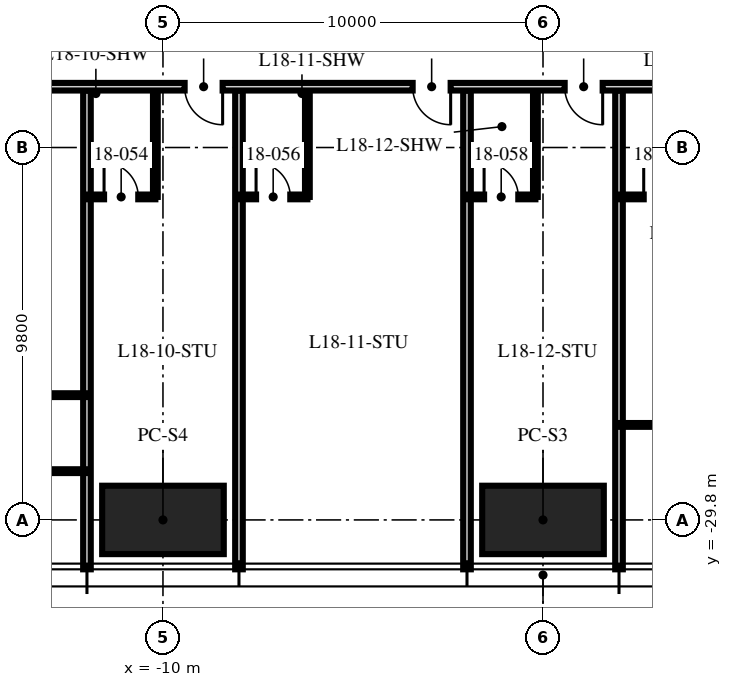
"""IFC4 building model, lengths in metres.
Left out: names, types, materials, properties, quantities, classifications, styles, units other than length and angle.
Written with IfcOpenShell. Run it as: python <this file> out.ifc"""

import sys

from ifc_helpers import new_model, si_unit, direction, frame, frame_2d, origin, origin_2d, place, context, subcontext, project, spatial, rectangle, hollow_rectangle, extrude, element, fill, save


model = new_model("IFC4")
c1 = context("Model", 3, precision=1e-05, world=origin(), true_north=direction((0.0, 1.0)))
c2 = subcontext(c1, "Body", "Model", "MODEL_VIEW")
j1 = project(units=[si_unit("LENGTHUNIT", "METRE"), si_unit("PLANEANGLEUNIT", "RADIAN")], contexts=[c1])
p1 = place(None, origin())
s1 = spatial("IfcSite", under=j1, at=p1, CompositionType="ELEMENT")
p2 = place(p1, origin())
s2 = spatial("IfcBuilding", under=s1, at=p2, CompositionType="ELEMENT")
p3 = place(p2, frame((0.0, 0.0, 73.5)))
s3 = spatial("IfcBuildingStorey", under=s2, at=p3, CompositionType="ELEMENT", Elevation=73.5)
for number, where, z_axis, x_axis in (
    (1, (0.0, -29.8, 0.0), (0.0, 0.0, 1.0), (1.0, 0.0, 0.0)),
    (2, (-10.0, -29.8, 0.0), (0.0, 0.0, 1.0), (1.0, 0.0, 0.0)),
):
    element("IfcColumn", number, at=place(p3, frame(where, z_axis=z_axis, x_axis=x_axis)), inside=s3, PredefinedType="COLUMN", context=c2, shape_type="SweptSolid", body=[
        extrude(hollow_rectangle(XDim=3.2, YDim=1.8, WallThickness=0.2, at=origin_2d()), origin(), (0.0, 0.0, 1.0), 3.75),
    ])
for number, where, z_axis, x_axis in (
    (3, (-12.0, -18.5, 0.0), (0.0, 0.0, 1.0), (0.0, -1.0, 0.0)),
    (4, (-8.0, -18.5, 0.0), (0.0, 0.0, 1.0), (0.0, -1.0, 0.0)),
    (5, (-2.0, -18.5, 0.0), (0.0, 0.0, 1.0), (0.0, -1.0, 0.0)),
    (6, (2.0, -18.5, 0.0), (0.0, 0.0, 1.0), (0.0, -1.0, 0.0)),
):
    element("IfcWall", number, at=place(p3, frame(where, z_axis=z_axis, x_axis=x_axis)), inside=s3, PredefinedType="PARTITIONING", context=c2, shape_type="SweptSolid", body=[
        extrude(rectangle(XDim=12.6, YDim=0.2, at=frame_2d((6.3, 0.0))), origin(), (0.0, 0.0, 1.0), 2.71),
    ])
p4 = place(p3, frame((-18.0, -28.517, 0.0), z_axis=(0.0, 0.0, 1.0), x_axis=(1.0, 0.0, 0.0)))
e7 = element("IfcWall", 7, at=p4, inside=s3, PredefinedType="PARTITIONING", context=c2, shape_type="SweptSolid", body=[
    extrude(rectangle(XDim=6.0, YDim=0.1, at=frame_2d((3.0, 0.0))), origin(), (0.0, 0.0, 1.0), 2.61),
])
p5 = place(p4, frame((0.15, 0.0, 0.0)))
e8 = element("IfcOpeningElement", 8, at=p5, cuts=e7, PredefinedType="OPENING", context=c2, shape_type="SweptSolid", body=[
    extrude(rectangle(XDim=0.9, YDim=2.1, at=frame_2d((0.45, 1.05))), frame((0.0, 0.06, 0.0), z_axis=(0.0, -1.0, 0.0), x_axis=(1.0, 0.0, 0.0)), (0.0, 0.0, 1.0), 0.12),
])
p6 = place(p4, frame((3.15, 0.0, 0.0)))
e9 = element("IfcOpeningElement", 9, at=p6, cuts=e7, PredefinedType="OPENING", context=c2, shape_type="SweptSolid", body=[
    extrude(rectangle(XDim=0.9, YDim=2.1, at=frame_2d((0.45, 1.05))), frame((0.0, 0.06, 0.0), z_axis=(0.0, -1.0, 0.0), x_axis=(1.0, 0.0, 0.0)), (0.0, 0.0, 1.0), 0.12),
])
p7 = place(p3, frame((-16.8, -26.517, 0.0), z_axis=(0.0, 0.0, 1.0), x_axis=(1.0, 0.0, 0.0)))
e10 = element("IfcWall", 10, at=p7, inside=s3, PredefinedType="PARTITIONING", context=c2, shape_type="SweptSolid", body=[
    extrude(rectangle(XDim=4.8, YDim=0.1, at=frame_2d((2.4, 0.0))), origin(), (0.0, 0.0, 1.0), 2.61),
])
p8 = place(p3, frame((-12.0, -21.3, 0.0), z_axis=(0.0, 0.0, 1.0), x_axis=(1.0, 0.0, 0.0)))
e11 = element("IfcWall", 11, at=p8, inside=s3, PredefinedType="PARTITIONING", context=c2, shape_type="SweptSolid", body=[
    extrude(rectangle(XDim=1.8, YDim=0.125, at=frame_2d((0.9, 0.0))), origin(), (0.0, 0.0, 1.0), 3.5),
])
p9 = place(p8, frame((0.45, 0.0, 0.0)))
e12 = element("IfcOpeningElement", 12, at=p9, cuts=e11, PredefinedType="OPENING", context=c2, shape_type="SweptSolid", body=[
    extrude(rectangle(XDim=0.9, YDim=2.1, at=frame_2d((0.45, 1.05))), frame((0.0, 0.073, 0.0), z_axis=(0.0, -1.0, 0.0), x_axis=(1.0, 0.0, 0.0)), (0.0, 0.0, 1.0), 0.145),
])
p10 = place(p3, frame((-10.2, -18.5, 0.0), z_axis=(0.0, 0.0, 1.0), x_axis=(0.0, -1.0, 0.0)))
e13 = element("IfcWall", 13, at=p10, inside=s3, PredefinedType="PARTITIONING", context=c2, shape_type="SweptSolid", body=[
    extrude(rectangle(XDim=2.8, YDim=0.125, at=frame_2d((1.4, 0.0))), origin(), (0.0, 0.0, 1.0), 2.492),
])
p11 = place(p3, frame((-8.0, -21.3, 0.0), z_axis=(0.0, 0.0, 1.0), x_axis=(1.0, 0.0, 0.0)))
e14 = element("IfcWall", 14, at=p11, inside=s3, PredefinedType="PARTITIONING", context=c2, shape_type="SweptSolid", body=[
    extrude(rectangle(XDim=1.8, YDim=0.125, at=frame_2d((0.9, 0.0))), origin(), (0.0, 0.0, 1.0), 3.5),
])
p12 = place(p11, frame((0.45, 0.0, 0.0)))
e15 = element("IfcOpeningElement", 15, at=p12, cuts=e14, PredefinedType="OPENING", context=c2, shape_type="SweptSolid", body=[
    extrude(rectangle(XDim=0.9, YDim=2.1, at=frame_2d((0.45, 1.05))), frame((0.0, 0.073, 0.0), z_axis=(0.0, -1.0, 0.0), x_axis=(1.0, 0.0, 0.0)), (0.0, 0.0, 1.0), 0.145),
])
p13 = place(p3, frame((-6.2, -18.5, 0.0), z_axis=(0.0, 0.0, 1.0), x_axis=(0.0, -1.0, 0.0)))
e16 = element("IfcWall", 16, at=p13, inside=s3, PredefinedType="PARTITIONING", context=c2, shape_type="SweptSolid", body=[
    extrude(rectangle(XDim=2.8, YDim=0.125, at=frame_2d((1.4, 0.0))), origin(), (0.0, 0.0, 1.0), 3.5),
])
p14 = place(p3, frame((-2.0, -21.3, 0.0), z_axis=(0.0, 0.0, 1.0), x_axis=(1.0, 0.0, 0.0)))
e17 = element("IfcWall", 17, at=p14, inside=s3, PredefinedType="PARTITIONING", context=c2, shape_type="SweptSolid", body=[
    extrude(rectangle(XDim=1.8, YDim=0.125, at=frame_2d((0.9, 0.0))), origin(), (0.0, 0.0, 1.0), 3.5),
])
p15 = place(p14, frame((0.45, 0.0, 0.0)))
e18 = element("IfcOpeningElement", 18, at=p15, cuts=e17, PredefinedType="OPENING", context=c2, shape_type="SweptSolid", body=[
    extrude(rectangle(XDim=0.9, YDim=2.1, at=frame_2d((0.45, 1.05))), frame((0.0, 0.073, 0.0), z_axis=(0.0, -1.0, 0.0), x_axis=(1.0, 0.0, 0.0)), (0.0, 0.0, 1.0), 0.145),
])
p16 = place(p3, frame((-0.2, -18.5, 0.0), z_axis=(0.0, 0.0, 1.0), x_axis=(0.0, -1.0, 0.0)))
e19 = element("IfcWall", 19, at=p16, inside=s3, PredefinedType="PARTITIONING", context=c2, shape_type="SweptSolid", body=[
    extrude(rectangle(XDim=2.8, YDim=0.125, at=frame_2d((1.4, 0.0))), origin(), (0.0, 0.0, 1.0), 2.492),
])
p17 = place(p3, frame((2.0, -27.3, 0.0), z_axis=(0.0, 0.0, 1.0), x_axis=(1.0, 0.0, 0.0)))
e20 = element("IfcWall", 20, at=p17, inside=s3, PredefinedType="PARTITIONING", context=c2, shape_type="SweptSolid", body=[
    extrude(rectangle(XDim=6.0, YDim=0.1, at=frame_2d((3.0, 0.0))), origin(), (0.0, 0.0, 1.0), 2.61),
])
p18 = place(p17, frame((2.55, 0.0, 0.0)))
e21 = element("IfcOpeningElement", 21, at=p18, cuts=e20, PredefinedType="OPENING", context=c2, shape_type="SweptSolid", body=[
    extrude(rectangle(XDim=0.9, YDim=2.1, at=frame_2d((0.45, 1.05))), frame((0.0, 0.06, 0.0), z_axis=(0.0, -1.0, 0.0), x_axis=(1.0, 0.0, 0.0)), (0.0, 0.0, 1.0), 0.12),
])
p19 = place(p3, frame((2.0, -21.3, 0.0), z_axis=(0.0, 0.0, 1.0), x_axis=(1.0, 0.0, 0.0)))
e22 = element("IfcWall", 22, at=p19, inside=s3, PredefinedType="PARTITIONING", context=c2, shape_type="SweptSolid", body=[
    extrude(rectangle(XDim=5.9, YDim=0.125, at=frame_2d((2.95, 0.0))), origin(), (0.0, 0.0, 1.0), 2.61),
])
p20 = place(p19, frame((0.65, 0.0, 0.0)))
e23 = element("IfcOpeningElement", 23, at=p20, cuts=e22, PredefinedType="OPENING", context=c2, shape_type="SweptSolid", body=[
    extrude(rectangle(XDim=0.9, YDim=2.1, at=frame_2d((0.45, 1.05))), frame((0.0, 0.073, 0.0), z_axis=(0.0, -1.0, 0.0), x_axis=(1.0, 0.0, 0.0)), (0.0, 0.0, 1.0), 0.145),
])
p21 = place(p19, frame((2.85, 0.0, 0.0)))
e24 = element("IfcOpeningElement", 24, at=p21, cuts=e22, PredefinedType="OPENING", context=c2, shape_type="SweptSolid", body=[
    extrude(rectangle(XDim=0.9, YDim=2.1, at=frame_2d((0.45, 1.05))), frame((0.0, 0.073, 0.0), z_axis=(0.0, -1.0, 0.0), x_axis=(1.0, 0.0, 0.0)), (0.0, 0.0, 1.0), 0.145),
])
p22 = place(p19, frame((4.7, 0.0, 0.0)))
e25 = element("IfcOpeningElement", 25, at=p22, cuts=e22, PredefinedType="OPENING", context=c2, shape_type="SweptSolid", body=[
    extrude(rectangle(XDim=0.9, YDim=2.1, at=frame_2d((0.45, 1.05))), frame((0.0, 0.073, 0.0), z_axis=(0.0, -1.0, 0.0), x_axis=(1.0, 0.0, 0.0)), (0.0, 0.0, 1.0), 0.145),
])
p23 = place(p3, frame((18.5, -18.4, 0.0), z_axis=(0.0, 0.0, 1.0), x_axis=(-1.0, 0.0, 0.0)))
e26 = element("IfcWall", 26, at=p23, inside=s3, PredefinedType="PARTITIONING", context=c2, shape_type="SweptSolid", body=[
    extrude(rectangle(XDim=37.0, YDim=0.2, at=frame_2d((18.5, 0.0))), origin(), (0.0, 0.0, 1.0), 2.3),
])
p24 = place(p23, frame((26.93, 0.0, 0.0)))
e27 = element("IfcOpeningElement", 27, at=p24, cuts=e26, PredefinedType="OPENING", context=c2, shape_type="SweptSolid", body=[
    extrude(rectangle(XDim=1.0, YDim=2.2, at=frame_2d((0.5, 1.1))), frame((0.0, 0.11, 0.0), z_axis=(0.0, -1.0, 0.0), x_axis=(1.0, 0.0, 0.0)), (0.0, 0.0, 1.0), 0.22),
])
p25 = place(p23, frame((20.93, 0.0, 0.0)))
e28 = element("IfcOpeningElement", 28, at=p25, cuts=e26, PredefinedType="OPENING", context=c2, shape_type="SweptSolid", body=[
    extrude(rectangle(XDim=1.0, YDim=2.2, at=frame_2d((0.5, 1.1))), frame((0.0, 0.11, 0.0), z_axis=(0.0, -1.0, 0.0), x_axis=(1.0, 0.0, 0.0)), (0.0, 0.0, 1.0), 0.22),
])
p26 = place(p23, frame((16.93, 0.0, 0.0)))
e29 = element("IfcOpeningElement", 29, at=p26, cuts=e26, PredefinedType="OPENING", context=c2, shape_type="SweptSolid", body=[
    extrude(rectangle(XDim=1.0, YDim=2.2, at=frame_2d((0.5, 1.1))), frame((0.0, 0.11, 0.0), z_axis=(0.0, -1.0, 0.0), x_axis=(1.0, 0.0, 0.0)), (0.0, 0.0, 1.0), 0.22),
])
p27 = place(p9, origin())
e30 = element("IfcDoor", 30, at=p27, inside=s3, OperationType="SINGLE_SWING_LEFT", PredefinedType="DOOR", context=c2, shape_type="SweptSolid", body=[
    extrude(rectangle(XDim=0.9, YDim=2.1, at=frame_2d((0.45, 1.05))), frame((0.0, 0.025, 0.0), z_axis=(0.0, -1.0, 0.0), x_axis=(1.0, 0.0, 0.0)), (0.0, 0.0, 1.0), 0.05),
])
fill(e12, e30)
p28 = place(p24, origin())
e31 = element("IfcDoor", 31, at=p28, inside=s3, OperationType="SINGLE_SWING_LEFT", PredefinedType="DOOR", context=c2, shape_type="SweptSolid", body=[
    extrude(rectangle(XDim=1.0, YDim=2.2, at=frame_2d((0.5, 1.1))), frame((0.0, 0.025, 0.0), z_axis=(0.0, -1.0, 0.0), x_axis=(1.0, 0.0, 0.0)), (0.0, 0.0, 1.0), 0.05),
])
fill(e27, e31)
p29 = place(p12, origin())
e32 = element("IfcDoor", 32, at=p29, inside=s3, OperationType="SINGLE_SWING_LEFT", PredefinedType="DOOR", context=c2, shape_type="SweptSolid", body=[
    extrude(rectangle(XDim=0.9, YDim=2.1, at=frame_2d((0.45, 1.05))), frame((0.0, 0.025, 0.0), z_axis=(0.0, -1.0, 0.0), x_axis=(1.0, 0.0, 0.0)), (0.0, 0.0, 1.0), 0.05),
])
fill(e15, e32)
p30 = place(p25, origin())
e33 = element("IfcDoor", 33, at=p30, inside=s3, OperationType="SINGLE_SWING_LEFT", PredefinedType="DOOR", context=c2, shape_type="SweptSolid", body=[
    extrude(rectangle(XDim=1.0, YDim=2.2, at=frame_2d((0.5, 1.1))), frame((0.0, 0.025, 0.0), z_axis=(0.0, -1.0, 0.0), x_axis=(1.0, 0.0, 0.0)), (0.0, 0.0, 1.0), 0.05),
])
fill(e28, e33)
p31 = place(p15, origin())
e34 = element("IfcDoor", 34, at=p31, inside=s3, OperationType="SINGLE_SWING_LEFT", PredefinedType="DOOR", context=c2, shape_type="SweptSolid", body=[
    extrude(rectangle(XDim=0.9, YDim=2.1, at=frame_2d((0.45, 1.05))), frame((0.0, 0.025, 0.0), z_axis=(0.0, -1.0, 0.0), x_axis=(1.0, 0.0, 0.0)), (0.0, 0.0, 1.0), 0.05),
])
fill(e18, e34)
p32 = place(p26, origin())
e35 = element("IfcDoor", 35, at=p32, inside=s3, OperationType="SINGLE_SWING_LEFT", PredefinedType="DOOR", context=c2, shape_type="SweptSolid", body=[
    extrude(rectangle(XDim=1.0, YDim=2.2, at=frame_2d((0.5, 1.1))), frame((0.0, 0.025, 0.0), z_axis=(0.0, -1.0, 0.0), x_axis=(1.0, 0.0, 0.0)), (0.0, 0.0, 1.0), 0.05),
])
fill(e29, e35)
p33 = place(p20, origin())
e36 = element("IfcDoor", 36, at=p33, inside=s3, OperationType="SINGLE_SWING_LEFT", PredefinedType="DOOR", context=c2, shape_type="SweptSolid", body=[
    extrude(rectangle(XDim=0.9, YDim=2.1, at=frame_2d((0.45, 1.05))), frame((0.0, 0.025, 0.0), z_axis=(0.0, -1.0, 0.0), x_axis=(1.0, 0.0, 0.0)), (0.0, 0.0, 1.0), 0.05),
])
fill(e23, e36)
save(model, sys.argv[1])
